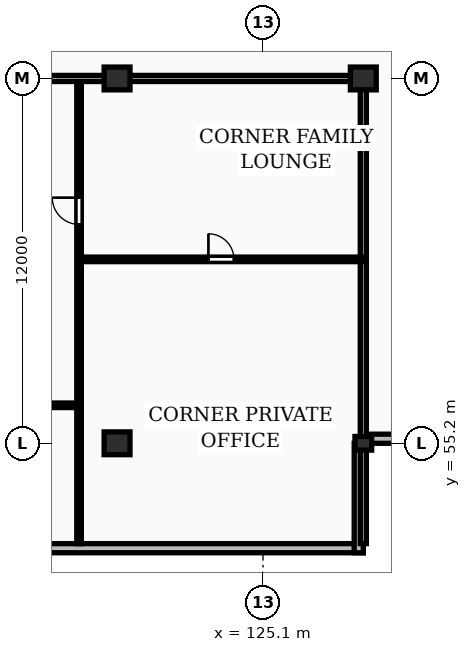
"""IFC4 building model, lengths in metres.
Left out: names, types, materials, properties, quantities, classifications, styles, units other than length and angle.
Written with IfcOpenShell. Run it as: python <this file> out.ifc"""

import sys

from ifc_helpers import new_model, si_unit, direction, frame, frame_2d, origin, origin_2d, place, context, subcontext, project, spatial, rectangle, extrude, element, fill, save


model = new_model("IFC4")
c1 = context("Model", 3, precision=1e-05, world=origin(), true_north=direction((0.0, 1.0)))
c2 = subcontext(c1, "Body", "Model", "MODEL_VIEW")
j1 = project(units=[si_unit("LENGTHUNIT", "METRE"), si_unit("PLANEANGLEUNIT", "RADIAN")], contexts=[c1])
p1 = place(None, origin())
s1 = spatial("IfcSite", under=j1, at=p1, CompositionType="ELEMENT")
p2 = place(p1, origin())
s2 = spatial("IfcBuilding", under=s1, at=p2, CompositionType="ELEMENT")
p3 = place(p2, frame((0.0, 0.0, 204.35)))
s3 = spatial("IfcBuildingStorey", under=s2, at=p3, CompositionType="ELEMENT", Elevation=204.35)
for number, where, z_axis, x_axis in (
    (1, (120.3, 55.2, 0.0), (0.0, 0.0, 1.0), (1.0, 0.0, 0.0)),
    (2, (120.3, 67.2, 0.0), (0.0, 0.0, 1.0), (1.0, 0.0, 0.0)),
):
    element("IfcColumn", number, at=place(p3, frame(where, z_axis=z_axis, x_axis=x_axis)), inside=s3, PredefinedType="COLUMN", context=c2, shape_type="SweptSolid", body=[
        extrude(rectangle(XDim=0.85, YDim=0.75, at=origin_2d()), origin(), (0.0, 0.0, 1.0), 3.25),
    ])
p4 = place(p3, frame((128.4, 55.2, 0.0), z_axis=(0.0, 0.0, 1.0), x_axis=(1.0, 0.0, 0.0)))
e3 = element("IfcColumn", 3, at=p4, inside=s3, PredefinedType="PILASTER", context=c2, shape_type="SweptSolid", body=[
    extrude(rectangle(XDim=0.55, YDim=0.45, at=origin_2d()), origin(), (0.0, 0.0, 1.0), 3.25),
])
p5 = place(p3, frame((128.4, 67.2, 0.0), z_axis=(0.0, 0.0, 1.0), x_axis=(1.0, 0.0, 0.0)))
e4 = element("IfcColumn", 4, at=p5, inside=s3, PredefinedType="COLUMN", context=c2, shape_type="SweptSolid", body=[
    extrude(rectangle(XDim=0.85, YDim=0.75, at=origin_2d()), origin(), (0.0, 0.0, 1.0), 3.25),
])
p6 = place(p3, frame((59.8, 51.75, 0.0), z_axis=(0.0, 0.0, 1.0), x_axis=(1.0, 0.0, 0.0)))
e5 = element("IfcWall", 5, at=p6, inside=s3, PredefinedType="STANDARD", context=c2, shape_type="SweptSolid", body=[
    extrude(rectangle(XDim=68.6, YDim=0.3, at=frame_2d((34.3, 0.0))), origin(), (0.0, 0.0, 1.0), 2.98),
])
p7 = place(p6, frame((13.025, 0.0, 0.85)))
e6 = element("IfcOpeningElement", 6, at=p7, cuts=e5, PredefinedType="OPENING", context=c2, shape_type="SweptSolid", body=[
    extrude(rectangle(XDim=1.8, YDim=1.8, at=frame_2d((0.9, 0.9))), frame((0.0, 0.16, 0.0), z_axis=(0.0, -1.0, 0.0), x_axis=(1.0, 0.0, 0.0)), (0.0, 0.0, 1.0), 0.32),
])
p8 = place(p6, frame((56.375, 0.0, 0.85)))
e7 = element("IfcOpeningElement", 7, at=p8, cuts=e5, PredefinedType="OPENING", context=c2, shape_type="SweptSolid", body=[
    extrude(rectangle(XDim=1.8, YDim=1.8, at=frame_2d((0.9, 0.9))), frame((0.0, 0.16, 0.0), z_axis=(0.0, -1.0, 0.0), x_axis=(1.0, 0.0, 0.0)), (0.0, 0.0, 1.0), 0.32),
])
p9 = place(p3, frame((128.25, 51.6, 0.0), z_axis=(0.0, 0.0, 1.0), x_axis=(0.0, 1.0, 0.0)))
e8 = element("IfcWall", 8, at=p9, inside=s3, PredefinedType="STANDARD", context=c2, shape_type="SweptSolid", body=[
    extrude(rectangle(XDim=3.6, YDim=0.3, at=frame_2d((1.8, 0.0))), origin(), (0.0, 0.0, 1.0), 2.98),
])
p10 = place(p3, frame((128.4, 55.35, 0.0), z_axis=(0.0, 0.0, 1.0), x_axis=(1.0, 0.0, 0.0)))
e9 = element("IfcWall", 9, at=p10, inside=s3, PredefinedType="STANDARD", context=c2, shape_type="SweptSolid", body=[
    extrude(rectangle(XDim=3.6, YDim=0.3, at=frame_2d((1.8, 0.0))), origin(), (0.0, 0.0, 1.0), 2.98),
])
p11 = place(p3, frame((128.4, 51.9, 0.0), z_axis=(0.0, 0.0, 1.0), x_axis=(0.0, 1.0, 0.0)))
e10 = element("IfcWall", 10, at=p11, inside=s3, PredefinedType="PARTITIONING", context=c2, shape_type="SweptSolid", body=[
    extrude(rectangle(XDim=15.3, YDim=0.2, at=frame_2d((7.65, 0.0))), origin(), (0.0, 0.0, 1.0), 2.287),
])
p12 = place(p3, frame((119.05, 61.25, 0.0), z_axis=(0.0, 0.0, 1.0), x_axis=(1.0, 0.0, 0.0)))
e11 = element("IfcWall", 11, at=p12, inside=s3, PredefinedType="PARTITIONING", context=c2, shape_type="SweptSolid", body=[
    extrude(rectangle(XDim=9.35, YDim=0.15, at=frame_2d((4.675, 0.0))), origin(), (0.0, 0.0, 1.0), 2.98),
])
p13 = place(p12, frame((4.255, 0.0, 0.0)))
e12 = element("IfcOpeningElement", 12, at=p13, cuts=e11, PredefinedType="OPENING", context=c2, shape_type="SweptSolid", body=[
    extrude(rectangle(XDim=0.84, YDim=2.04, at=frame_2d((0.42, 1.02))), frame((0.0, 0.085, 0.0), z_axis=(0.0, -1.0, 0.0), x_axis=(1.0, 0.0, 0.0)), (0.0, 0.0, 1.0), 0.17),
])
p14 = place(p3, frame((119.05, 51.9, 0.0), z_axis=(0.0, 0.0, 1.0), x_axis=(0.0, 1.0, 0.0)))
e13 = element("IfcWall", 13, at=p14, inside=s3, PredefinedType="PARTITIONING", context=c2, shape_type="SweptSolid", body=[
    extrude(rectangle(XDim=15.25, YDim=0.15, at=frame_2d((7.625, 0.0))), origin(), (0.0, 0.0, 1.0), 2.98),
])
p15 = place(p14, frame((10.5, 0.0, 0.0)))
e14 = element("IfcOpeningElement", 14, at=p15, cuts=e13, PredefinedType="OPENING", context=c2, shape_type="SweptSolid", body=[
    extrude(rectangle(XDim=0.88, YDim=2.06, at=frame_2d((0.44, 1.03))), frame((0.0, 0.085, 0.0), z_axis=(0.0, -1.0, 0.0), x_axis=(1.0, 0.0, 0.0)), (0.0, 0.0, 1.0), 0.17),
])
p16 = place(p3, frame((112.27, 56.45, 0.0), z_axis=(0.0, 0.0, 1.0), x_axis=(1.0, 0.0, 0.0)))
e15 = element("IfcWall", 15, at=p16, inside=s3, PredefinedType="PARTITIONING", context=c2, shape_type="SweptSolid", body=[
    extrude(rectangle(XDim=6.76, YDim=0.15, at=frame_2d((3.38, 0.0))), origin(), (0.0, 0.0, 1.0), 2.98),
])
p17 = place(p16, frame((1.64, 0.0, 0.0)))
e16 = element("IfcOpeningElement", 16, at=p17, cuts=e15, PredefinedType="OPENING", context=c2, shape_type="SweptSolid", body=[
    extrude(rectangle(XDim=0.84, YDim=2.04, at=frame_2d((0.42, 1.02))), frame((0.0, 0.085, 0.0), z_axis=(0.0, -1.0, 0.0), x_axis=(1.0, 0.0, 0.0)), (0.0, 0.0, 1.0), 0.17),
])
p18 = place(p16, frame((3.16, 0.0, 0.0)))
e17 = element("IfcOpeningElement", 17, at=p18, cuts=e15, PredefinedType="OPENING", context=c2, shape_type="SweptSolid", body=[
    extrude(rectangle(XDim=0.88, YDim=2.06, at=frame_2d((0.44, 1.03))), frame((0.0, 0.085, 0.0), z_axis=(0.0, -1.0, 0.0), x_axis=(1.0, 0.0, 0.0)), (0.0, 0.0, 1.0), 0.17),
])
p19 = place(p3, frame((112.25, 67.2, 0.0), z_axis=(0.0, 0.0, 1.0), x_axis=(1.0, 0.0, 0.0)))
e18 = element("IfcWall", 18, at=p19, inside=s3, PredefinedType="PARTITIONING", context=c2, shape_type="SweptSolid", body=[
    extrude(rectangle(XDim=16.15, YDim=0.2, at=frame_2d((8.075, 0.0))), origin(), (0.0, 0.0, 1.0), 2.443),
])
p20 = place(p19, frame((1.58, 0.0, 0.0)))
e19 = element("IfcOpeningElement", 19, at=p20, cuts=e18, PredefinedType="OPENING", context=c2, shape_type="SweptSolid", body=[
    extrude(rectangle(XDim=0.95, YDim=2.15, at=frame_2d((0.475, 1.075))), frame((0.0, 0.11, 0.0), z_axis=(0.0, -1.0, 0.0), x_axis=(1.0, 0.0, 0.0)), (0.0, 0.0, 1.0), 0.22),
])
p21 = place(p13, origin())
e20 = element("IfcDoor", 20, at=p21, inside=s3, OperationType="SINGLE_SWING_LEFT", PredefinedType="DOOR", context=c2, shape_type="SweptSolid", body=[
    extrude(rectangle(XDim=0.84, YDim=2.04, at=frame_2d((0.42, 1.02))), frame((0.0, 0.025, 0.0), z_axis=(0.0, -1.0, 0.0), x_axis=(1.0, 0.0, 0.0)), (0.0, 0.0, 1.0), 0.05),
])
fill(e12, e20)
p22 = place(p15, origin())
e21 = element("IfcDoor", 21, at=p22, inside=s3, OperationType="SINGLE_SWING_RIGHT", PredefinedType="DOOR", context=c2, shape_type="SweptSolid", body=[
    extrude(rectangle(XDim=0.88, YDim=2.06, at=frame_2d((0.44, 1.03))), frame((0.0, 0.025, 0.0), z_axis=(0.0, -1.0, 0.0), x_axis=(1.0, 0.0, 0.0)), (0.0, 0.0, 1.0), 0.05),
])
fill(e14, e21)
save(model, sys.argv[1])
